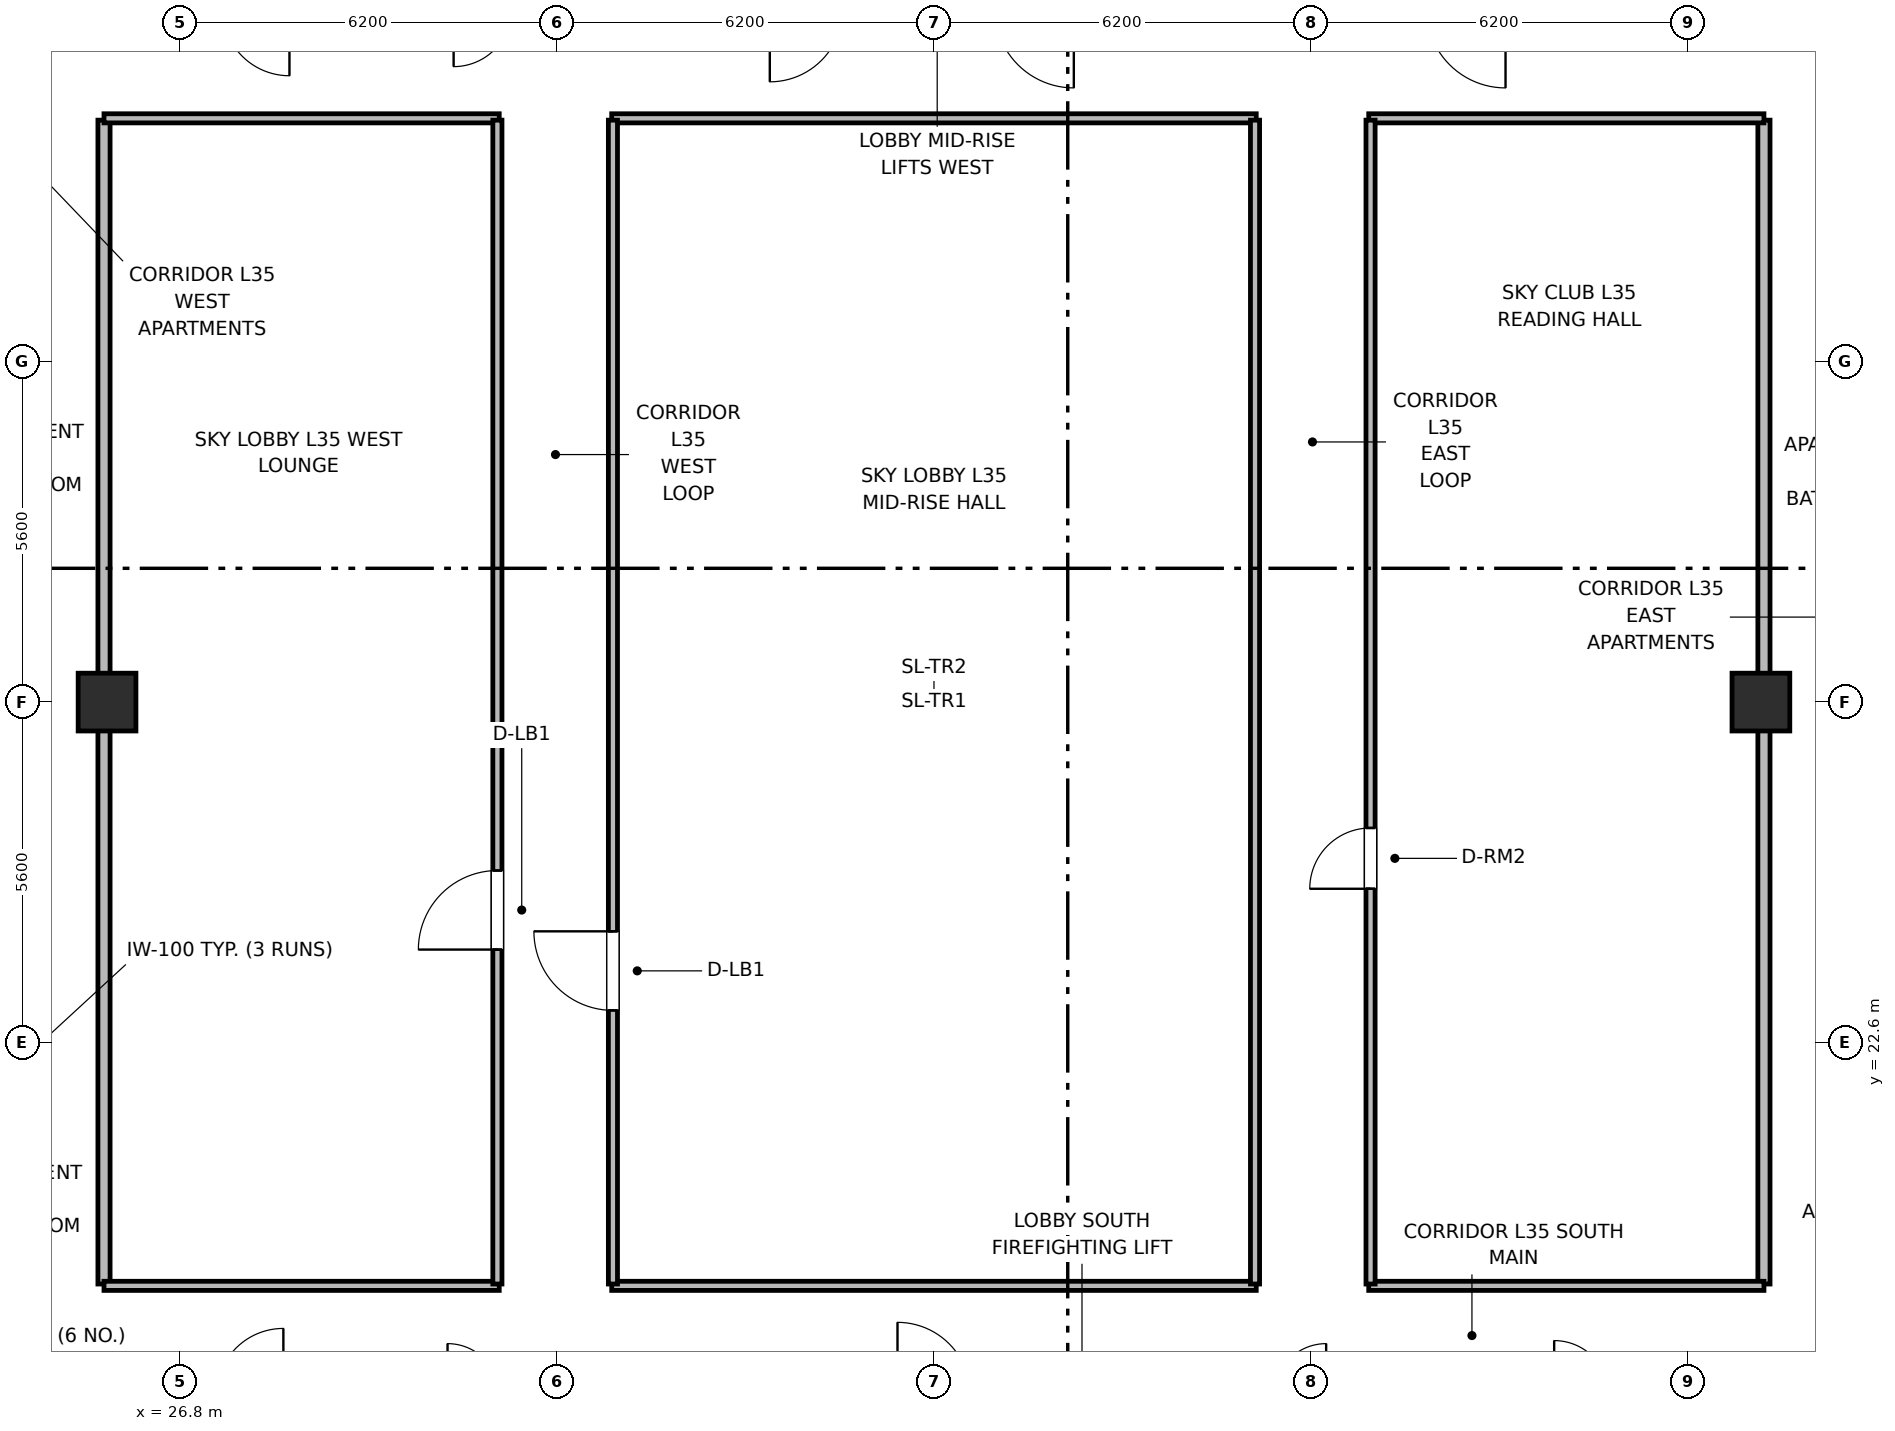
"""IFC4 building model, lengths in metres.
Left out: names, types, materials, properties, quantities, classifications, styles, units other than length and angle.
Written with IfcOpenShell. Run it as: python <this file> out.ifc"""

import sys

from ifc_helpers import new_model, si_unit, direction, frame, frame_2d, origin, origin_2d, place, context, subcontext, project, spatial, rectangle, extrude, element, fill, save


model = new_model("IFC4")
c1 = context("Model", 3, precision=1e-05, world=origin(), true_north=direction((0.0, 1.0)))
c2 = subcontext(c1, "Body", "Model", "MODEL_VIEW")
j1 = project(units=[si_unit("LENGTHUNIT", "METRE"), si_unit("PLANEANGLEUNIT", "RADIAN")], contexts=[c1])
p1 = place(None, origin())
s1 = spatial("IfcSite", under=j1, at=p1, CompositionType="ELEMENT")
p2 = place(p1, origin())
s2 = spatial("IfcBuilding", under=s1, at=p2, CompositionType="ELEMENT")
p3 = place(p2, frame((0.0, 0.0, 143.6)))
s3 = spatial("IfcBuildingStorey", under=s2, at=p3, CompositionType="ELEMENT", Elevation=143.6)
for number, where, z_axis, x_axis in (
    (1, (25.6, 28.2, 0.0), (0.0, 0.0, 1.0), (1.0, 0.0, 0.0)),
    (2, (52.8, 28.2, 0.0), (0.0, 0.0, 1.0), (1.0, 0.0, 0.0)),
):
    element("IfcColumn", number, at=place(p3, frame(where, z_axis=z_axis, x_axis=x_axis)), inside=s3, PredefinedType="COLUMN", context=c2, shape_type="SweptSolid", body=[
        extrude(rectangle(XDim=0.95, YDim=0.95, at=origin_2d()), origin(), (0.0, 0.0, 1.0), 4.2),
    ])
for number, where, z_axis, x_axis in (
    (3, (25.55, 18.63, 0.0), (0.0, 0.0, 1.0), (0.0, 1.0, 0.0)),
    (4, (52.85, 18.63, 0.0), (0.0, 0.0, 1.0), (0.0, 1.0, 0.0)),
):
    element("IfcWall", number, at=place(p3, frame(where, z_axis=z_axis, x_axis=x_axis)), inside=s3, PredefinedType="PARTITIONING", context=c2, shape_type="SweptSolid", body=[
        extrude(rectangle(XDim=19.14, YDim=0.2, at=frame_2d((9.57, 0.0))), origin(), (0.0, 0.0, 1.0), 3.05),
    ])
for number, where, z_axis, x_axis in (
    (5, (25.55, 18.6, 0.0), (0.0, 0.0, 1.0), (1.0, 0.0, 0.0)),
    (6, (25.55, 37.8, 0.0), (0.0, 0.0, 1.0), (1.0, 0.0, 0.0)),
):
    element("IfcWall", number, at=place(p3, frame(where, z_axis=z_axis, x_axis=x_axis)), inside=s3, PredefinedType="PARTITIONING", context=c2, shape_type="SweptSolid", body=[
        extrude(rectangle(XDim=6.5, YDim=0.15, at=frame_2d((3.25, 0.0))), origin(), (0.0, 0.0, 1.0), 3.05),
    ])
for number, where, z_axis, x_axis in (
    (7, (33.9, 18.6, 0.0), (0.0, 0.0, 1.0), (1.0, 0.0, 0.0)),
    (8, (33.9, 37.8, 0.0), (0.0, 0.0, 1.0), (1.0, 0.0, 0.0)),
):
    element("IfcWall", number, at=place(p3, frame(where, z_axis=z_axis, x_axis=x_axis)), inside=s3, PredefinedType="PARTITIONING", context=c2, shape_type="SweptSolid", body=[
        extrude(rectangle(XDim=10.6, YDim=0.15, at=frame_2d((5.3, 0.0))), origin(), (0.0, 0.0, 1.0), 3.05),
    ])
for number, where, z_axis, x_axis in (
    (9, (46.35, 18.6, 0.0), (0.0, 0.0, 1.0), (1.0, 0.0, 0.0)),
    (10, (46.35, 37.8, 0.0), (0.0, 0.0, 1.0), (1.0, 0.0, 0.0)),
):
    element("IfcWall", number, at=place(p3, frame(where, z_axis=z_axis, x_axis=x_axis)), inside=s3, PredefinedType="PARTITIONING", context=c2, shape_type="SweptSolid", body=[
        extrude(rectangle(XDim=6.5, YDim=0.15, at=frame_2d((3.25, 0.0))), origin(), (0.0, 0.0, 1.0), 3.05),
    ])
p4 = place(p3, frame((32.02, 18.63, 0.0), z_axis=(0.0, 0.0, 1.0), x_axis=(0.0, 1.0, 0.0)))
e11 = element("IfcWall", 11, at=p4, inside=s3, PredefinedType="PARTITIONING", context=c2, shape_type="SweptSolid", body=[
    extrude(rectangle(XDim=19.14, YDim=0.15, at=frame_2d((9.57, 0.0))), origin(), (0.0, 0.0, 1.0), 3.05),
])
p5 = place(p4, frame((5.5, 0.0, 0.0)))
e12 = element("IfcOpeningElement", 12, at=p5, cuts=e11, PredefinedType="OPENING", context=c2, shape_type="SweptSolid", body=[
    extrude(rectangle(XDim=1.3, YDim=2.2, at=frame_2d((0.65, 1.1))), frame((0.0, 0.085, 0.0), z_axis=(0.0, -1.0, 0.0), x_axis=(1.0, 0.0, 0.0)), (0.0, 0.0, 1.0), 0.17),
])
p6 = place(p3, frame((33.92, 18.63, 0.0), z_axis=(0.0, 0.0, 1.0), x_axis=(0.0, 1.0, 0.0)))
e13 = element("IfcWall", 13, at=p6, inside=s3, PredefinedType="PARTITIONING", context=c2, shape_type="SweptSolid", body=[
    extrude(rectangle(XDim=19.14, YDim=0.15, at=frame_2d((9.57, 0.0))), origin(), (0.0, 0.0, 1.0), 3.05),
])
p7 = place(p6, frame((4.5, 0.0, 0.0)))
e14 = element("IfcOpeningElement", 14, at=p7, cuts=e13, PredefinedType="OPENING", context=c2, shape_type="SweptSolid", body=[
    extrude(rectangle(XDim=1.3, YDim=2.2, at=frame_2d((0.65, 1.1))), frame((0.0, 0.085, 0.0), z_axis=(0.0, -1.0, 0.0), x_axis=(1.0, 0.0, 0.0)), (0.0, 0.0, 1.0), 0.17),
])
p8 = place(p3, frame((44.48, 18.63, 0.0), z_axis=(0.0, 0.0, 1.0), x_axis=(0.0, 1.0, 0.0)))
e15 = element("IfcWall", 15, at=p8, inside=s3, PredefinedType="PARTITIONING", context=c2, shape_type="SweptSolid", body=[
    extrude(rectangle(XDim=19.14, YDim=0.15, at=frame_2d((9.57, 0.0))), origin(), (0.0, 0.0, 1.0), 3.05),
])
p9 = place(p3, frame((46.38, 18.63, 0.0), z_axis=(0.0, 0.0, 1.0), x_axis=(0.0, 1.0, 0.0)))
e16 = element("IfcWall", 16, at=p9, inside=s3, PredefinedType="PARTITIONING", context=c2, shape_type="SweptSolid", body=[
    extrude(rectangle(XDim=19.14, YDim=0.15, at=frame_2d((9.57, 0.0))), origin(), (0.0, 0.0, 1.0), 3.05),
])
p10 = place(p9, frame((6.5, 0.0, 0.0)))
e17 = element("IfcOpeningElement", 17, at=p10, cuts=e16, PredefinedType="OPENING", context=c2, shape_type="SweptSolid", body=[
    extrude(rectangle(XDim=1.0, YDim=2.15, at=frame_2d((0.5, 1.075))), frame((0.0, 0.085, 0.0), z_axis=(0.0, -1.0, 0.0), x_axis=(1.0, 0.0, 0.0)), (0.0, 0.0, 1.0), 0.17),
])
p11 = place(p5, origin())
e18 = element("IfcDoor", 18, at=p11, inside=s3, OperationType="SINGLE_SWING_LEFT", PredefinedType="DOOR", context=c2, shape_type="SweptSolid", body=[
    extrude(rectangle(XDim=1.3, YDim=2.2, at=frame_2d((0.65, 1.1))), frame((0.0, 0.025, 0.0), z_axis=(0.0, -1.0, 0.0), x_axis=(1.0, 0.0, 0.0)), (0.0, 0.0, 1.0), 0.05),
])
fill(e12, e18)
p12 = place(p7, origin())
e19 = element("IfcDoor", 19, at=p12, inside=s3, OperationType="SINGLE_SWING_RIGHT", PredefinedType="DOOR", context=c2, shape_type="SweptSolid", body=[
    extrude(rectangle(XDim=1.3, YDim=2.2, at=frame_2d((0.65, 1.1))), frame((0.0, 0.025, 0.0), z_axis=(0.0, -1.0, 0.0), x_axis=(1.0, 0.0, 0.0)), (0.0, 0.0, 1.0), 0.05),
])
fill(e14, e19)
p13 = place(p10, origin())
e20 = element("IfcDoor", 20, at=p13, inside=s3, OperationType="SINGLE_SWING_LEFT", PredefinedType="DOOR", context=c2, shape_type="SweptSolid", body=[
    extrude(rectangle(XDim=1.0, YDim=2.15, at=frame_2d((0.5, 1.075))), frame((0.0, 0.025, 0.0), z_axis=(0.0, -1.0, 0.0), x_axis=(1.0, 0.0, 0.0)), (0.0, 0.0, 1.0), 0.05),
])
fill(e17, e20)
save(model, sys.argv[1])
